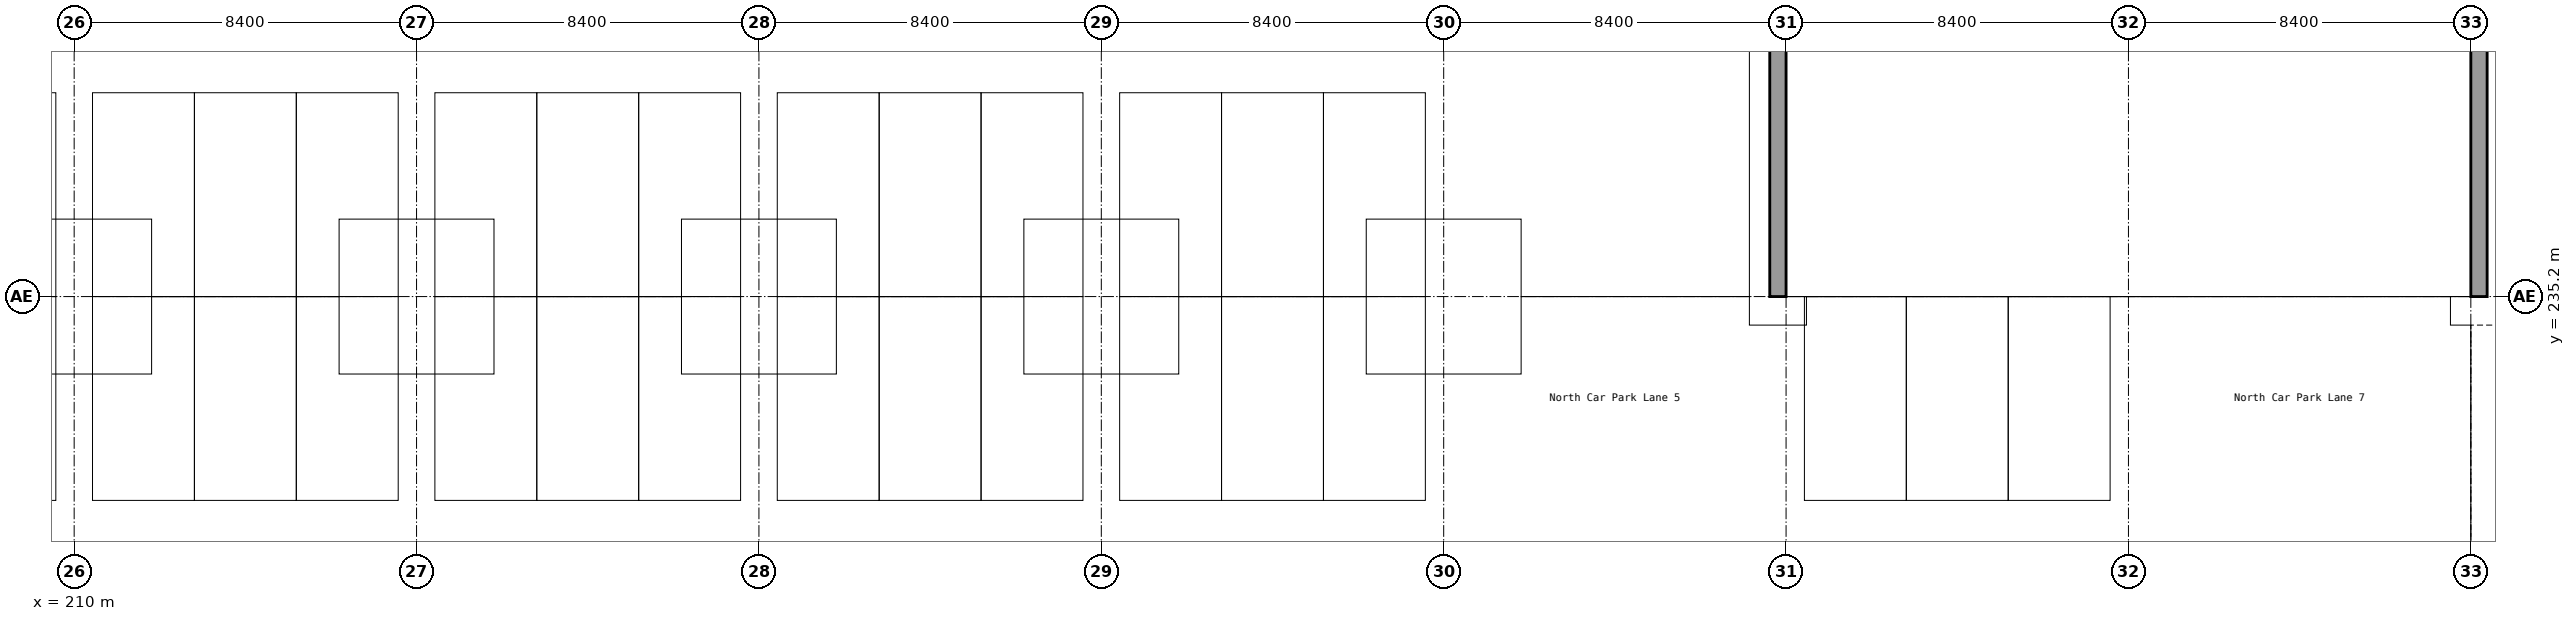
"""IFC4 building model, lengths in metres.
Left out: names, types, materials, properties, quantities, classifications, styles, units other than length and angle.
Written with IfcOpenShell. Run it as: python <this file> out.ifc"""

import sys

from ifc_helpers import new_model, si_unit, direction, frame, origin, origin_2d, place, context, subcontext, project, spatial, polyline, rectangle, outline, extrude, element, save


model = new_model("IFC4")
c1 = context("Model", 3, precision=1e-05, world=origin(), true_north=direction((0.0, 1.0)))
c2 = subcontext(c1, "Body", "Model", "MODEL_VIEW")
j1 = project(units=[si_unit("LENGTHUNIT", "METRE"), si_unit("PLANEANGLEUNIT", "RADIAN")], contexts=[c1])
p1 = place(None, origin())
s1 = spatial("IfcSite", under=j1, at=p1, CompositionType="ELEMENT")
p2 = place(p1, origin())
s2 = spatial("IfcBuilding", under=s1, at=p2, CompositionType="ELEMENT")
p3 = place(p2, frame((0.0, 0.0, -3.0)))
s3 = spatial("IfcBuildingStorey", under=s2, at=p3, CompositionType="ELEMENT", Elevation=-3.0)
for number, where, z_axis, x_axis in (
    (1, (210.0, 235.2, 0.0), (0.0, 0.0, 1.0), (1.0, 0.0, 0.0)),
    (2, (218.4, 235.2, 0.0), (0.0, 0.0, 1.0), (1.0, 0.0, 0.0)),
    (3, (226.8, 235.2, 0.0), (0.0, 0.0, 1.0), (1.0, 0.0, 0.0)),
    (4, (235.2, 235.2, 0.0), (0.0, 0.0, 1.0), (1.0, 0.0, 0.0)),
    (5, (243.6, 235.2, 0.0), (0.0, 0.0, 1.0), (1.0, 0.0, 0.0)),
):
    element("IfcColumn", number, at=place(p3, frame(where, z_axis=z_axis, x_axis=x_axis)), inside=s3, PredefinedType="COLUMN", context=c2, shape_type="SweptSolid", body=[
        extrude(rectangle(XDim=0.8, YDim=0.8, at=origin_2d()), origin(), (0.0, 0.0, 1.0), 2.4),
    ])
for number, where, z_axis, x_axis in (
    (6, (251.8, 268.8, 0.0), (0.0, 0.0, 1.0), (0.0, -1.0, 0.0)),
    (7, (269.0, 268.8, 0.0), (0.0, 0.0, 1.0), (0.0, -1.0, 0.0)),
):
    element("IfcWall", number, at=place(p3, frame(where, z_axis=z_axis, x_axis=x_axis)), inside=s3, PredefinedType="SOLIDWALL", context=c2, shape_type="SweptSolid", body=[
        extrude(outline(polyline([(0.0, 0.0), (33.6, 0.0), (33.6, 4.1), (0.0, 1.1), (0.0, 0.0)])), frame((0.0, 0.2, 0.0), z_axis=(0.0, -1.0, 0.0), x_axis=(1.0, 0.0, 0.0)), (0.0, 0.0, 1.0), 0.4),
    ])
save(model, sys.argv[1])
